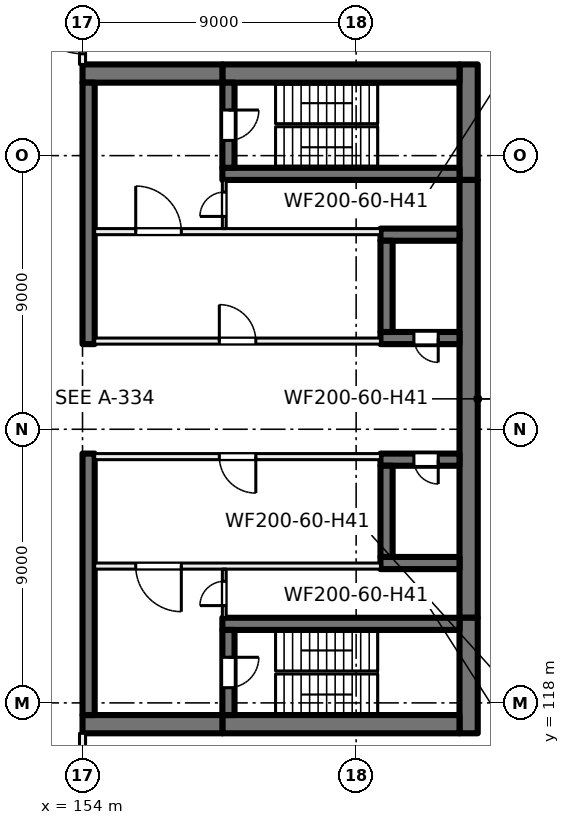
"""IFC4 building model, lengths in metres.
Left out: names, types, materials, properties, quantities, classifications, styles, units other than length and angle.
Written with IfcOpenShell. Run it as: python <this file> out.ifc"""

import sys

from ifc_helpers import new_model, si_unit, direction, frame, frame_2d, origin, place, context, subcontext, project, spatial, rectangle, extrude, element, fill, save


model = new_model("IFC4")
c1 = context("Model", 3, precision=1e-05, world=origin(), true_north=direction((0.0, 1.0)))
c2 = subcontext(c1, "Body", "Model", "MODEL_VIEW")
j1 = project(units=[si_unit("LENGTHUNIT", "METRE"), si_unit("PLANEANGLEUNIT", "RADIAN")], contexts=[c1])
p1 = place(None, origin())
s1 = spatial("IfcSite", under=j1, at=p1, CompositionType="ELEMENT")
p2 = place(p1, origin())
s2 = spatial("IfcBuilding", under=s1, at=p2, CompositionType="ELEMENT")
p3 = place(p2, frame((0.0, 0.0, -9.0)))
s3 = spatial("IfcBuildingStorey", under=s2, at=p3, CompositionType="ELEMENT", Elevation=-9.0)
p4 = place(p3, frame((166.7, 139.0, 0.0), z_axis=(0.0, 0.0, 1.0), x_axis=(0.0, -1.0, 0.0)))
e1 = element("IfcWall", 1, at=p4, inside=s3, PredefinedType="SHEAR", context=c2, shape_type="SweptSolid", body=[
    extrude(rectangle(XDim=3.8, YDim=0.6, at=frame_2d((1.9, 0.0))), origin(), (0.0, 0.0, 1.0), 4.5),
])
p5 = place(p3, frame((166.7, 135.2, 0.0), z_axis=(0.0, 0.0, 1.0), x_axis=(0.0, -1.0, 0.0)))
e2 = element("IfcWall", 2, at=p5, inside=s3, PredefinedType="SHEAR", context=c2, shape_type="SweptSolid", body=[
    extrude(rectangle(XDim=14.4, YDim=0.6, at=frame_2d((7.2, 0.0))), origin(), (0.0, 0.0, 1.0), 4.5),
])
p6 = place(p3, frame((166.7, 120.8, 0.0), z_axis=(0.0, 0.0, 1.0), x_axis=(0.0, -1.0, 0.0)))
e3 = element("IfcWall", 3, at=p6, inside=s3, PredefinedType="SHEAR", context=c2, shape_type="SweptSolid", body=[
    extrude(rectangle(XDim=3.8, YDim=0.6, at=frame_2d((1.9, 0.0))), origin(), (0.0, 0.0, 1.0), 4.5),
])
for number, where, z_axis, x_axis in (
    (4, (166.4, 138.7, 0.0), (0.0, 0.0, 1.0), (-1.0, 0.0, 0.0)),
    (5, (166.4, 117.3, 0.0), (0.0, 0.0, 1.0), (-1.0, 0.0, 0.0)),
):
    element("IfcWall", number, at=place(p3, frame(where, z_axis=z_axis, x_axis=x_axis)), inside=s3, PredefinedType="SHEAR", context=c2, shape_type="SweptSolid", body=[
        extrude(rectangle(XDim=7.8, YDim=0.6, at=frame_2d((3.9, 0.0))), origin(), (0.0, 0.0, 1.0), 4.5),
    ])
for number, where, z_axis, x_axis in (
    (6, (158.6, 138.7, 0.0), (0.0, 0.0, 1.0), (-1.0, 0.0, 0.0)),
    (7, (158.6, 117.3, 0.0), (0.0, 0.0, 1.0), (-1.0, 0.0, 0.0)),
):
    element("IfcWall", number, at=place(p3, frame(where, z_axis=z_axis, x_axis=x_axis)), inside=s3, PredefinedType="SHEAR", context=c2, shape_type="SweptSolid", body=[
        extrude(rectangle(XDim=4.6, YDim=0.6, at=frame_2d((2.3, 0.0))), origin(), (0.0, 0.0, 1.0), 4.5),
    ])
p7 = place(p3, frame((166.4, 135.4, 0.0), z_axis=(0.0, 0.0, 1.0), x_axis=(-1.0, 0.0, 0.0)))
e8 = element("IfcWall", 8, at=p7, inside=s3, PredefinedType="SHEAR", context=c2, shape_type="SweptSolid", body=[
    extrude(rectangle(XDim=7.8, YDim=0.4, at=frame_2d((3.9, 0.0))), origin(), (0.0, 0.0, 1.0), 4.5),
])
p8 = place(p3, frame((158.8, 138.4, 0.0), z_axis=(0.0, 0.0, 1.0), x_axis=(0.0, -1.0, 0.0)))
e9 = element("IfcWall", 9, at=p8, inside=s3, PredefinedType="SHEAR", context=c2, shape_type="SweptSolid", body=[
    extrude(rectangle(XDim=2.8, YDim=0.4, at=frame_2d((1.4, 0.0))), origin(), (0.0, 0.0, 1.0), 4.5),
])
p9 = place(p8, frame((0.9, 0.0, 0.0)))
e10 = element("IfcOpeningElement", 10, at=p9, cuts=e9, PredefinedType="OPENING", context=c2, shape_type="SweptSolid", body=[
    extrude(rectangle(XDim=1.0, YDim=2.1, at=frame_2d((0.5, 1.05))), frame((0.0, 0.21, 0.0), z_axis=(0.0, -1.0, 0.0), x_axis=(1.0, 0.0, 0.0)), (0.0, 0.0, 1.0), 0.42),
])
p10 = place(p3, frame((166.4, 120.6, 0.0), z_axis=(0.0, 0.0, 1.0), x_axis=(-1.0, 0.0, 0.0)))
e11 = element("IfcWall", 11, at=p10, inside=s3, PredefinedType="SHEAR", context=c2, shape_type="SweptSolid", body=[
    extrude(rectangle(XDim=7.8, YDim=0.4, at=frame_2d((3.9, 0.0))), origin(), (0.0, 0.0, 1.0), 4.5),
])
p11 = place(p3, frame((158.8, 120.4, 0.0), z_axis=(0.0, 0.0, 1.0), x_axis=(0.0, -1.0, 0.0)))
e12 = element("IfcWall", 12, at=p11, inside=s3, PredefinedType="SHEAR", context=c2, shape_type="SweptSolid", body=[
    extrude(rectangle(XDim=2.8, YDim=0.4, at=frame_2d((1.4, 0.0))), origin(), (0.0, 0.0, 1.0), 4.5),
])
p12 = place(p11, frame((0.9, 0.0, 0.0)))
e13 = element("IfcOpeningElement", 13, at=p12, cuts=e12, PredefinedType="OPENING", context=c2, shape_type="SweptSolid", body=[
    extrude(rectangle(XDim=1.0, YDim=2.1, at=frame_2d((0.5, 1.05))), frame((0.0, 0.21, 0.0), z_axis=(0.0, -1.0, 0.0), x_axis=(1.0, 0.0, 0.0)), (0.0, 0.0, 1.0), 0.42),
])
p13 = place(p3, frame((166.4, 130.0, 0.0), z_axis=(0.0, 0.0, 1.0), x_axis=(-1.0, 0.0, 0.0)))
e14 = element("IfcWall", 14, at=p13, inside=s3, PredefinedType="SHEAR", context=c2, shape_type="SweptSolid", body=[
    extrude(rectangle(XDim=2.6, YDim=0.4, at=frame_2d((1.3, 0.0))), origin(), (0.0, 0.0, 1.0), 4.5),
])
p14 = place(p13, frame((0.7, 0.0, 0.0)))
e15 = element("IfcOpeningElement", 15, at=p14, cuts=e14, PredefinedType="OPENING", context=c2, shape_type="SweptSolid", body=[
    extrude(rectangle(XDim=0.8, YDim=2.1, at=frame_2d((0.4, 1.05))), frame((0.0, 0.21, 0.0), z_axis=(0.0, -1.0, 0.0), x_axis=(1.0, 0.0, 0.0)), (0.0, 0.0, 1.0), 0.42),
])
p15 = place(p3, frame((166.4, 133.4, 0.0), z_axis=(0.0, 0.0, 1.0), x_axis=(-1.0, 0.0, 0.0)))
e16 = element("IfcWall", 16, at=p15, inside=s3, PredefinedType="SHEAR", context=c2, shape_type="SweptSolid", body=[
    extrude(rectangle(XDim=2.6, YDim=0.4, at=frame_2d((1.3, 0.0))), origin(), (0.0, 0.0, 1.0), 4.5),
])
p16 = place(p3, frame((164.0, 133.2, 0.0), z_axis=(0.0, 0.0, 1.0), x_axis=(0.0, -1.0, 0.0)))
e17 = element("IfcWall", 17, at=p16, inside=s3, PredefinedType="SHEAR", context=c2, shape_type="SweptSolid", body=[
    extrude(rectangle(XDim=3.0, YDim=0.4, at=frame_2d((1.5, 0.0))), origin(), (0.0, 0.0, 1.0), 4.5),
])
p17 = place(p3, frame((166.4, 126.0, 0.0), z_axis=(0.0, 0.0, 1.0), x_axis=(-1.0, 0.0, 0.0)))
e18 = element("IfcWall", 18, at=p17, inside=s3, PredefinedType="SHEAR", context=c2, shape_type="SweptSolid", body=[
    extrude(rectangle(XDim=2.6, YDim=0.4, at=frame_2d((1.3, 0.0))), origin(), (0.0, 0.0, 1.0), 4.5),
])
p18 = place(p17, frame((0.7, 0.0, 0.0)))
e19 = element("IfcOpeningElement", 19, at=p18, cuts=e18, PredefinedType="OPENING", context=c2, shape_type="SweptSolid", body=[
    extrude(rectangle(XDim=0.8, YDim=2.1, at=frame_2d((0.4, 1.05))), frame((0.0, 0.21, 0.0), z_axis=(0.0, -1.0, 0.0), x_axis=(1.0, 0.0, 0.0)), (0.0, 0.0, 1.0), 0.42),
])
p19 = place(p3, frame((166.4, 122.6, 0.0), z_axis=(0.0, 0.0, 1.0), x_axis=(-1.0, 0.0, 0.0)))
e20 = element("IfcWall", 20, at=p19, inside=s3, PredefinedType="SHEAR", context=c2, shape_type="SweptSolid", body=[
    extrude(rectangle(XDim=2.6, YDim=0.4, at=frame_2d((1.3, 0.0))), origin(), (0.0, 0.0, 1.0), 4.5),
])
p20 = place(p3, frame((164.0, 125.8, 0.0), z_axis=(0.0, 0.0, 1.0), x_axis=(0.0, -1.0, 0.0)))
e21 = element("IfcWall", 21, at=p20, inside=s3, PredefinedType="SHEAR", context=c2, shape_type="SweptSolid", body=[
    extrude(rectangle(XDim=3.0, YDim=0.4, at=frame_2d((1.5, 0.0))), origin(), (0.0, 0.0, 1.0), 4.5),
])
for number, where, z_axis, x_axis in (
    (22, (154.2, 138.4, 0.0), (0.0, 0.0, 1.0), (0.0, -1.0, 0.0)),
    (23, (154.2, 126.2, 0.0), (0.0, 0.0, 1.0), (0.0, -1.0, 0.0)),
):
    element("IfcWall", number, at=place(p3, frame(where, z_axis=z_axis, x_axis=x_axis)), inside=s3, PredefinedType="SHEAR", context=c2, shape_type="SweptSolid", body=[
        extrude(rectangle(XDim=8.6, YDim=0.4, at=frame_2d((4.3, 0.0))), origin(), (0.0, 0.0, 1.0), 4.5),
    ])
p21 = place(p3, frame((163.8, 126.1, 0.0), z_axis=(0.0, 0.0, 1.0), x_axis=(-1.0, 0.0, 0.0)))
e24 = element("IfcWall", 24, at=p21, inside=s3, PredefinedType="PARTITIONING", context=c2, shape_type="SweptSolid", body=[
    extrude(rectangle(XDim=9.4, YDim=0.2, at=frame_2d((4.7, 0.0))), origin(), (0.0, 0.0, 1.0), 4.125),
])
p22 = place(p21, frame((4.1, 0.0, 0.0)))
e25 = element("IfcOpeningElement", 25, at=p22, cuts=e24, PredefinedType="OPENING", context=c2, shape_type="SweptSolid", body=[
    extrude(rectangle(XDim=1.2, YDim=2.1, at=frame_2d((0.6, 1.05))), frame((0.0, 0.11, 0.0), z_axis=(0.0, -1.0, 0.0), x_axis=(1.0, 0.0, 0.0)), (0.0, 0.0, 1.0), 0.22),
])
p23 = place(p3, frame((163.8, 122.5, 0.0), z_axis=(0.0, 0.0, 1.0), x_axis=(-1.0, 0.0, 0.0)))
e26 = element("IfcWall", 26, at=p23, inside=s3, PredefinedType="PARTITIONING", context=c2, shape_type="SweptSolid", body=[
    extrude(rectangle(XDim=9.4, YDim=0.2, at=frame_2d((4.7, 0.0))), origin(), (0.0, 0.0, 1.0), 4.125),
])
p24 = place(p23, frame((6.55, 0.0, 0.0)))
e27 = element("IfcOpeningElement", 27, at=p24, cuts=e26, PredefinedType="OPENING", context=c2, shape_type="SweptSolid", body=[
    extrude(rectangle(XDim=1.5, YDim=2.1, at=frame_2d((0.75, 1.05))), frame((0.0, 0.11, 0.0), z_axis=(0.0, -1.0, 0.0), x_axis=(1.0, 0.0, 0.0)), (0.0, 0.0, 1.0), 0.22),
])
p25 = place(p3, frame((158.663, 120.8, 0.0), z_axis=(0.0, 0.0, 1.0), x_axis=(0.0, 1.0, 0.0)))
e28 = element("IfcWall", 28, at=p25, inside=s3, PredefinedType="PARTITIONING", context=c2, shape_type="SweptSolid", body=[
    extrude(rectangle(XDim=1.6, YDim=0.125, at=frame_2d((0.8, 0.0))), origin(), (0.0, 0.0, 1.0), 4.125),
])
p26 = place(p25, frame((0.4, 0.0, 0.0)))
e29 = element("IfcOpeningElement", 29, at=p26, cuts=e28, PredefinedType="OPENING", context=c2, shape_type="SweptSolid", body=[
    extrude(rectangle(XDim=0.8, YDim=2.1, at=frame_2d((0.4, 1.05))), frame((0.0, 0.073, 0.0), z_axis=(0.0, -1.0, 0.0), x_axis=(1.0, 0.0, 0.0)), (0.0, 0.0, 1.0), 0.145),
])
p27 = place(p3, frame((154.4, 129.9, 0.0), z_axis=(0.0, 0.0, 1.0), x_axis=(1.0, 0.0, 0.0)))
e30 = element("IfcWall", 30, at=p27, inside=s3, PredefinedType="PARTITIONING", context=c2, shape_type="SweptSolid", body=[
    extrude(rectangle(XDim=9.4, YDim=0.2, at=frame_2d((4.7, 0.0))), origin(), (0.0, 0.0, 1.0), 4.125),
])
p28 = place(p27, frame((4.1, 0.0, 0.0)))
e31 = element("IfcOpeningElement", 31, at=p28, cuts=e30, PredefinedType="OPENING", context=c2, shape_type="SweptSolid", body=[
    extrude(rectangle(XDim=1.2, YDim=2.1, at=frame_2d((0.6, 1.05))), frame((0.0, 0.11, 0.0), z_axis=(0.0, -1.0, 0.0), x_axis=(1.0, 0.0, 0.0)), (0.0, 0.0, 1.0), 0.22),
])
p29 = place(p3, frame((154.4, 133.5, 0.0), z_axis=(0.0, 0.0, 1.0), x_axis=(1.0, 0.0, 0.0)))
e32 = element("IfcWall", 32, at=p29, inside=s3, PredefinedType="PARTITIONING", context=c2, shape_type="SweptSolid", body=[
    extrude(rectangle(XDim=9.4, YDim=0.2, at=frame_2d((4.7, 0.0))), origin(), (0.0, 0.0, 1.0), 4.125),
])
p30 = place(p29, frame((1.35, 0.0, 0.0)))
e33 = element("IfcOpeningElement", 33, at=p30, cuts=e32, PredefinedType="OPENING", context=c2, shape_type="SweptSolid", body=[
    extrude(rectangle(XDim=1.5, YDim=2.1, at=frame_2d((0.75, 1.05))), frame((0.0, 0.11, 0.0), z_axis=(0.0, -1.0, 0.0), x_axis=(1.0, 0.0, 0.0)), (0.0, 0.0, 1.0), 0.22),
])
p31 = place(p3, frame((158.663, 133.6, 0.0), z_axis=(0.0, 0.0, 1.0), x_axis=(0.0, 1.0, 0.0)))
e34 = element("IfcWall", 34, at=p31, inside=s3, PredefinedType="PARTITIONING", context=c2, shape_type="SweptSolid", body=[
    extrude(rectangle(XDim=1.6, YDim=0.125, at=frame_2d((0.8, 0.0))), origin(), (0.0, 0.0, 1.0), 4.125),
])
p32 = place(p31, frame((0.4, 0.0, 0.0)))
e35 = element("IfcOpeningElement", 35, at=p32, cuts=e34, PredefinedType="OPENING", context=c2, shape_type="SweptSolid", body=[
    extrude(rectangle(XDim=0.8, YDim=2.1, at=frame_2d((0.4, 1.05))), frame((0.0, 0.073, 0.0), z_axis=(0.0, -1.0, 0.0), x_axis=(1.0, 0.0, 0.0)), (0.0, 0.0, 1.0), 0.145),
])
p33 = place(p3, frame((154.0, 104.1, 0.0), z_axis=(0.0, 0.0, 1.0), x_axis=(0.0, 1.0, 0.0)))
e36 = element("IfcWall", 36, at=p33, inside=s3, PredefinedType="PARTITIONING", context=c2, shape_type="SweptSolid", body=[
    extrude(rectangle(XDim=12.9, YDim=0.2, at=frame_2d((6.45, 0.0))), origin(), (0.0, 0.0, 1.0), 4.125),
])
p34 = place(p3, frame((154.0, 141.5, 0.0), z_axis=(0.0, 0.0, 1.0), x_axis=(0.0, -1.0, 0.0)))
e37 = element("IfcWall", 37, at=p34, inside=s3, PredefinedType="PARTITIONING", context=c2, shape_type="SweptSolid", body=[
    extrude(rectangle(XDim=2.5, YDim=0.2, at=frame_2d((1.25, 0.0))), origin(), (0.0, 0.0, 1.0), 4.125),
])
p35 = place(p34, frame((0.35, 0.0, 0.0)))
e38 = element("IfcOpeningElement", 38, at=p35, cuts=e37, PredefinedType="OPENING", context=c2, shape_type="SweptSolid", body=[
    extrude(rectangle(XDim=1.8, YDim=2.1, at=frame_2d((0.9, 1.05))), frame((0.0, 0.11, 0.0), z_axis=(0.0, -1.0, 0.0), x_axis=(1.0, 0.0, 0.0)), (0.0, 0.0, 1.0), 0.22),
])
p36 = place(p18, origin())
e39 = element("IfcDoor", 39, at=p36, inside=s3, OperationType="SINGLE_SWING_LEFT", PredefinedType="DOOR", context=c2, shape_type="SweptSolid", body=[
    extrude(rectangle(XDim=0.8, YDim=2.1, at=frame_2d((0.4, 1.05))), frame((0.0, 0.025, 0.0), z_axis=(0.0, -1.0, 0.0), x_axis=(1.0, 0.0, 0.0)), (0.0, 0.0, 1.0), 0.05),
])
fill(e19, e39)
p37 = place(p14, origin())
e40 = element("IfcDoor", 40, at=p37, inside=s3, OperationType="SINGLE_SWING_RIGHT", PredefinedType="DOOR", context=c2, shape_type="SweptSolid", body=[
    extrude(rectangle(XDim=0.8, YDim=2.1, at=frame_2d((0.4, 1.05))), frame((0.0, 0.025, 0.0), z_axis=(0.0, -1.0, 0.0), x_axis=(1.0, 0.0, 0.0)), (0.0, 0.0, 1.0), 0.05),
])
fill(e15, e40)
p38 = place(p22, origin())
e41 = element("IfcDoor", 41, at=p38, inside=s3, OperationType="DOUBLE_DOOR_SINGLE_SWING", PredefinedType="DOOR", context=c2, shape_type="SweptSolid", body=[
    extrude(rectangle(XDim=1.2, YDim=2.1, at=frame_2d((0.6, 1.05))), frame((0.0, 0.025, 0.0), z_axis=(0.0, -1.0, 0.0), x_axis=(1.0, 0.0, 0.0)), (0.0, 0.0, 1.0), 0.05),
])
fill(e25, e41)
p39 = place(p24, origin())
e42 = element("IfcDoor", 42, at=p39, inside=s3, OperationType="DOUBLE_DOOR_SINGLE_SWING", PredefinedType="DOOR", context=c2, shape_type="SweptSolid", body=[
    extrude(rectangle(XDim=1.5, YDim=2.1, at=frame_2d((0.75, 1.05))), frame((0.0, 0.025, 0.0), z_axis=(0.0, -1.0, 0.0), x_axis=(1.0, 0.0, 0.0)), (0.0, 0.0, 1.0), 0.05),
])
fill(e27, e42)
p40 = place(p12, origin())
e43 = element("IfcDoor", 43, at=p40, inside=s3, OperationType="SINGLE_SWING_LEFT", PredefinedType="DOOR", context=c2, shape_type="SweptSolid", body=[
    extrude(rectangle(XDim=1.0, YDim=2.1, at=frame_2d((0.5, 1.05))), frame((0.0, 0.025, 0.0), z_axis=(0.0, -1.0, 0.0), x_axis=(1.0, 0.0, 0.0)), (0.0, 0.0, 1.0), 0.05),
])
fill(e13, e43)
p41 = place(p26, origin())
e44 = element("IfcDoor", 44, at=p41, inside=s3, OperationType="SINGLE_SWING_RIGHT", PredefinedType="DOOR", context=c2, shape_type="SweptSolid", body=[
    extrude(rectangle(XDim=0.8, YDim=2.1, at=frame_2d((0.4, 1.05))), frame((0.0, 0.025, 0.0), z_axis=(0.0, -1.0, 0.0), x_axis=(1.0, 0.0, 0.0)), (0.0, 0.0, 1.0), 0.05),
])
fill(e29, e44)
p42 = place(p28, origin())
e45 = element("IfcDoor", 45, at=p42, inside=s3, OperationType="DOUBLE_DOOR_SINGLE_SWING", PredefinedType="DOOR", context=c2, shape_type="SweptSolid", body=[
    extrude(rectangle(XDim=1.2, YDim=2.1, at=frame_2d((0.6, 1.05))), frame((0.0, 0.025, 0.0), z_axis=(0.0, -1.0, 0.0), x_axis=(1.0, 0.0, 0.0)), (0.0, 0.0, 1.0), 0.05),
])
fill(e31, e45)
p43 = place(p30, origin())
e46 = element("IfcDoor", 46, at=p43, inside=s3, OperationType="DOUBLE_DOOR_SINGLE_SWING", PredefinedType="DOOR", context=c2, shape_type="SweptSolid", body=[
    extrude(rectangle(XDim=1.5, YDim=2.1, at=frame_2d((0.75, 1.05))), frame((0.0, 0.025, 0.0), z_axis=(0.0, -1.0, 0.0), x_axis=(1.0, 0.0, 0.0)), (0.0, 0.0, 1.0), 0.05),
])
fill(e33, e46)
p44 = place(p9, origin())
e47 = element("IfcDoor", 47, at=p44, inside=s3, OperationType="SINGLE_SWING_RIGHT", PredefinedType="DOOR", context=c2, shape_type="SweptSolid", body=[
    extrude(rectangle(XDim=1.0, YDim=2.1, at=frame_2d((0.5, 1.05))), frame((0.0, 0.025, 0.0), z_axis=(0.0, -1.0, 0.0), x_axis=(1.0, 0.0, 0.0)), (0.0, 0.0, 1.0), 0.05),
])
fill(e10, e47)
p45 = place(p32, origin())
e48 = element("IfcDoor", 48, at=p45, inside=s3, OperationType="SINGLE_SWING_LEFT", PredefinedType="DOOR", context=c2, shape_type="SweptSolid", body=[
    extrude(rectangle(XDim=0.8, YDim=2.1, at=frame_2d((0.4, 1.05))), frame((0.0, 0.025, 0.0), z_axis=(0.0, -1.0, 0.0), x_axis=(1.0, 0.0, 0.0)), (0.0, 0.0, 1.0), 0.05),
])
fill(e35, e48)
p46 = place(p35, origin())
e49 = element("IfcDoor", 49, at=p46, inside=s3, OperationType="DOUBLE_DOOR_SINGLE_SWING", PredefinedType="DOOR", context=c2, shape_type="SweptSolid", body=[
    extrude(rectangle(XDim=1.8, YDim=2.1, at=frame_2d((0.9, 1.05))), frame((0.0, 0.025, 0.0), z_axis=(0.0, -1.0, 0.0), x_axis=(1.0, 0.0, 0.0)), (0.0, 0.0, 1.0), 0.05),
])
fill(e38, e49)
save(model, sys.argv[1])
